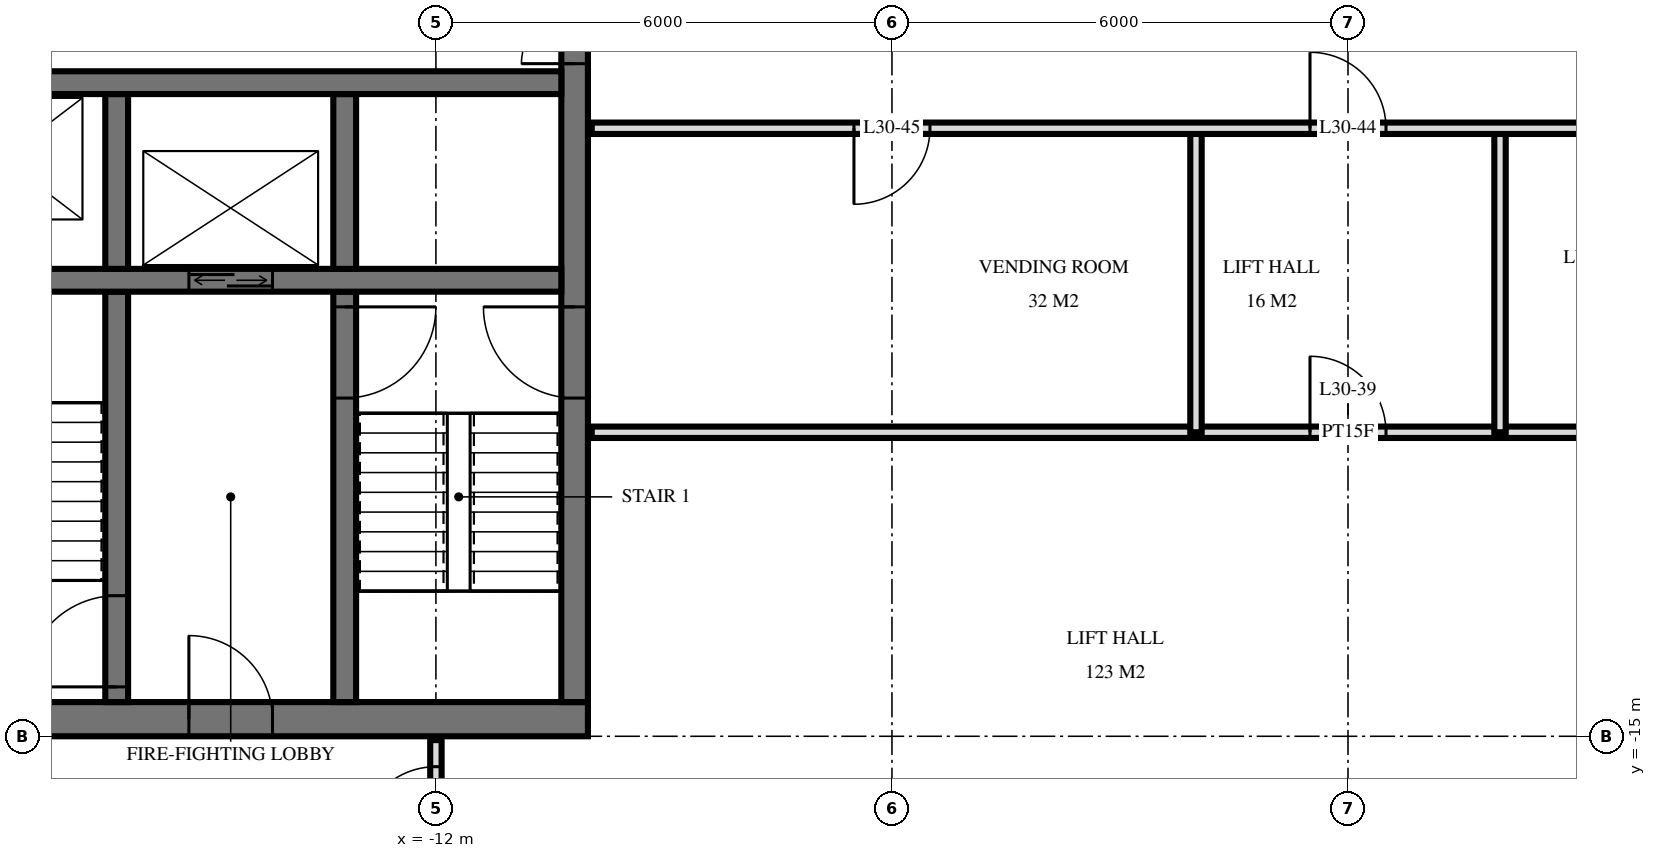
"""IFC4 building model, lengths in metres.
Left out: names, types, materials, properties, quantities, classifications, styles, units other than length and angle.
Written with IfcOpenShell. Run it as: python <this file> out.ifc"""

import sys

from ifc_helpers import new_model, si_unit, direction, frame, frame_2d, origin, place, context, subcontext, project, spatial, rectangle, extrude, element, fill, save


model = new_model("IFC4")
c1 = context("Model", 3, precision=1e-05, world=origin(), true_north=direction((0.0, 1.0)))
c2 = subcontext(c1, "Body", "Model", "MODEL_VIEW")
j1 = project(units=[si_unit("LENGTHUNIT", "METRE"), si_unit("PLANEANGLEUNIT", "RADIAN")], contexts=[c1])
p1 = place(None, origin())
s1 = spatial("IfcSite", under=j1, at=p1, CompositionType="ELEMENT")
p2 = place(p1, origin())
s2 = spatial("IfcBuilding", under=s1, at=p2, CompositionType="ELEMENT")
p3 = place(p2, frame((0.0, 0.0, 120.0)))
s3 = spatial("IfcBuildingStorey", under=s2, at=p3, CompositionType="ELEMENT", Elevation=120.0)
p4 = place(p3, frame((-24.5, -14.775, 0.0), z_axis=(0.0, 0.0, 1.0), x_axis=(1.0, 0.0, 0.0)))
e1 = element("IfcWall", 1, at=p4, inside=s3, PredefinedType="SHEAR", context=c2, shape_type="SweptSolid", body=[
    extrude(rectangle(XDim=14.5, YDim=0.45, at=frame_2d((7.25, 0.0))), origin(), (0.0, 0.0, 1.0), 3.6),
])
p5 = place(p4, frame((6.2, 0.0, 0.0)))
e2 = element("IfcOpeningElement", 2, at=p5, cuts=e1, PredefinedType="OPENING", context=c2, shape_type="SweptSolid", body=[
    extrude(rectangle(XDim=1.2, YDim=2.1, at=frame_2d((0.6, 1.05))), frame((0.0, 0.235, 0.0), z_axis=(0.0, -1.0, 0.0), x_axis=(1.0, 0.0, 0.0)), (0.0, 0.0, 1.0), 0.47),
])
p6 = place(p4, frame((9.25, 0.0, 0.0)))
e3 = element("IfcOpeningElement", 3, at=p6, cuts=e1, PredefinedType="OPENING", context=c2, shape_type="SweptSolid", body=[
    extrude(rectangle(XDim=1.1, YDim=2.1, at=frame_2d((0.55, 1.05))), frame((0.0, 0.235, 0.0), z_axis=(0.0, -1.0, 0.0), x_axis=(1.0, 0.0, 0.0)), (0.0, 0.0, 1.0), 0.47),
])
p7 = place(p4, frame((3.5, 0.0, 0.0)))
e4 = element("IfcOpeningElement", 4, at=p7, cuts=e1, PredefinedType="OPENING", context=c2, shape_type="SweptSolid", body=[
    extrude(rectangle(XDim=0.9, YDim=2.1, at=frame_2d((0.45, 1.05))), frame((0.0, 0.235, 0.0), z_axis=(0.0, -1.0, 0.0), x_axis=(1.0, 0.0, 0.0)), (0.0, 0.0, 1.0), 0.47),
])
p8 = place(p4, frame((1.05, 0.0, 0.0)))
e5 = element("IfcOpeningElement", 5, at=p8, cuts=e1, PredefinedType="OPENING", context=c2, shape_type="SweptSolid", body=[
    extrude(rectangle(XDim=1.0, YDim=2.1, at=frame_2d((0.5, 1.05))), frame((0.0, 0.235, 0.0), z_axis=(0.0, -1.0, 0.0), x_axis=(1.0, 0.0, 0.0)), (0.0, 0.0, 1.0), 0.47),
])
p9 = place(p3, frame((-10.175, -14.55, 0.0), z_axis=(0.0, 0.0, 1.0), x_axis=(0.0, 1.0, 0.0)))
e6 = element("IfcWall", 6, at=p9, inside=s3, PredefinedType="SHEAR", context=c2, shape_type="SweptSolid", body=[
    extrude(rectangle(XDim=14.1, YDim=0.35, at=frame_2d((7.05, 0.0))), origin(), (0.0, 0.0, 1.0), 3.6),
])
p10 = place(p9, frame((8.4, 0.0, 0.0)))
e7 = element("IfcOpeningElement", 7, at=p10, cuts=e6, PredefinedType="OPENING", context=c2, shape_type="SweptSolid", body=[
    extrude(rectangle(XDim=1.4, YDim=2.4, at=frame_2d((0.7, 1.2))), frame((0.0, 0.185, 0.0), z_axis=(0.0, -1.0, 0.0), x_axis=(1.0, 0.0, 0.0)), (0.0, 0.0, 1.0), 0.37),
])
p11 = place(p9, frame((10.0, 0.0, 0.0)))
e8 = element("IfcOpeningElement", 8, at=p11, cuts=e6, PredefinedType="OPENING", context=c2, shape_type="SweptSolid", body=[
    extrude(rectangle(XDim=1.4, YDim=2.4, at=frame_2d((0.7, 1.2))), frame((0.0, 0.185, 0.0), z_axis=(0.0, -1.0, 0.0), x_axis=(1.0, 0.0, 0.0)), (0.0, 0.0, 1.0), 0.37),
])
p12 = place(p9, frame((4.0, 0.0, 0.0)))
e9 = element("IfcOpeningElement", 9, at=p12, cuts=e6, PredefinedType="OPENING", context=c2, shape_type="SweptSolid", body=[
    extrude(rectangle(XDim=1.2, YDim=2.1, at=frame_2d((0.6, 1.05))), frame((0.0, 0.185, 0.0), z_axis=(0.0, -1.0, 0.0), x_axis=(1.0, 0.0, 0.0)), (0.0, 0.0, 1.0), 0.37),
])
p13 = place(p3, frame((-24.05, -6.4, 0.0), z_axis=(0.0, 0.0, 1.0), x_axis=(1.0, 0.0, 0.0)))
e10 = element("IfcWall", 10, at=p13, inside=s3, PredefinedType="SHEAR", context=c2, shape_type="SweptSolid", body=[
    extrude(rectangle(XDim=13.7, YDim=0.3, at=frame_2d((6.85, 0.0))), origin(), (0.0, 0.0, 1.0), 3.6),
])
p14 = place(p13, frame((0.55, 0.0, 0.0)))
e11 = element("IfcOpeningElement", 11, at=p14, cuts=e10, PredefinedType="OPENING", context=c2, shape_type="SweptSolid", body=[
    extrude(rectangle(XDim=1.1, YDim=2.1, at=frame_2d((0.55, 1.05))), frame((0.0, 0.16, 0.0), z_axis=(0.0, -1.0, 0.0), x_axis=(1.0, 0.0, 0.0)), (0.0, 0.0, 1.0), 0.32),
])
p15 = place(p13, frame((5.8, 0.0, 0.0)))
e12 = element("IfcOpeningElement", 12, at=p15, cuts=e10, PredefinedType="OPENING", context=c2, shape_type="SweptSolid", body=[
    extrude(rectangle(XDim=1.1, YDim=2.1, at=frame_2d((0.55, 1.05))), frame((0.0, 0.16, 0.0), z_axis=(0.0, -1.0, 0.0), x_axis=(1.0, 0.0, 0.0)), (0.0, 0.0, 1.0), 0.32),
])
p16 = place(p3, frame((-24.05, -9.0, 0.0), z_axis=(0.0, 0.0, 1.0), x_axis=(1.0, 0.0, 0.0)))
e13 = element("IfcWall", 13, at=p16, inside=s3, PredefinedType="SHEAR", context=c2, shape_type="SweptSolid", body=[
    extrude(rectangle(XDim=13.7, YDim=0.3, at=frame_2d((6.85, 0.0))), origin(), (0.0, 0.0, 1.0), 3.6),
])
p17 = place(p16, frame((8.8, 0.0, 0.0)))
e14 = element("IfcOpeningElement", 14, at=p17, cuts=e13, PredefinedType="OPENING", context=c2, shape_type="SweptSolid", body=[
    extrude(rectangle(XDim=1.1, YDim=2.1, at=frame_2d((0.55, 1.05))), frame((0.0, 0.16, 0.0), z_axis=(0.0, -1.0, 0.0), x_axis=(1.0, 0.0, 0.0)), (0.0, 0.0, 1.0), 0.32),
])
p18 = place(p3, frame((-13.2, -8.85, 0.0), z_axis=(0.0, 0.0, 1.0), x_axis=(0.0, 1.0, 0.0)))
e15 = element("IfcWall", 15, at=p18, inside=s3, PredefinedType="SHEAR", context=c2, shape_type="SweptSolid", body=[
    extrude(rectangle(XDim=2.3, YDim=0.3, at=frame_2d((1.15, 0.0))), origin(), (0.0, 0.0, 1.0), 3.6),
])
p19 = place(p3, frame((-13.2, -14.55, 0.0), z_axis=(0.0, 0.0, 1.0), x_axis=(0.0, 1.0, 0.0)))
e16 = element("IfcWall", 16, at=p19, inside=s3, PredefinedType="SHEAR", context=c2, shape_type="SweptSolid", body=[
    extrude(rectangle(XDim=5.4, YDim=0.3, at=frame_2d((2.7, 0.0))), origin(), (0.0, 0.0, 1.0), 3.6),
])
p20 = place(p19, frame((4.0, 0.0, 0.0)))
e17 = element("IfcOpeningElement", 17, at=p20, cuts=e16, PredefinedType="OPENING", context=c2, shape_type="SweptSolid", body=[
    extrude(rectangle(XDim=1.2, YDim=2.1, at=frame_2d((0.6, 1.05))), frame((0.0, 0.16, 0.0), z_axis=(0.0, -1.0, 0.0), x_axis=(1.0, 0.0, 0.0)), (0.0, 0.0, 1.0), 0.32),
])
p21 = place(p3, frame((-16.2, -8.85, 0.0), z_axis=(0.0, 0.0, 1.0), x_axis=(0.0, 1.0, 0.0)))
e18 = element("IfcWall", 18, at=p21, inside=s3, PredefinedType="SHEAR", context=c2, shape_type="SweptSolid", body=[
    extrude(rectangle(XDim=2.3, YDim=0.3, at=frame_2d((1.15, 0.0))), origin(), (0.0, 0.0, 1.0), 3.6),
])
p22 = place(p3, frame((-16.2, -14.55, 0.0), z_axis=(0.0, 0.0, 1.0), x_axis=(0.0, 1.0, 0.0)))
e19 = element("IfcWall", 19, at=p22, inside=s3, PredefinedType="SHEAR", context=c2, shape_type="SweptSolid", body=[
    extrude(rectangle(XDim=5.4, YDim=0.3, at=frame_2d((2.7, 0.0))), origin(), (0.0, 0.0, 1.0), 3.6),
])
p23 = place(p22, frame((0.2, 0.0, 0.0)))
e20 = element("IfcOpeningElement", 20, at=p23, cuts=e19, PredefinedType="OPENING", context=c2, shape_type="SweptSolid", body=[
    extrude(rectangle(XDim=1.2, YDim=2.1, at=frame_2d((0.6, 1.05))), frame((0.0, 0.16, 0.0), z_axis=(0.0, -1.0, 0.0), x_axis=(1.0, 0.0, 0.0)), (0.0, 0.0, 1.0), 0.32),
])
for number, where, z_axis, x_axis in (
    (21, (2.0, -11.0, 0.0), (0.0, 0.0, 1.0), (0.0, 1.0, 0.0)),
    (22, (-2.0, -11.0, 0.0), (0.0, 0.0, 1.0), (0.0, 1.0, 0.0)),
):
    element("IfcWall", number, at=place(p3, frame(where, z_axis=z_axis, x_axis=x_axis)), inside=s3, PredefinedType="PARTITIONING", context=c2, shape_type="SweptSolid", body=[
        extrude(rectangle(XDim=4.0, YDim=0.15, at=frame_2d((2.0, 0.0))), origin(), (0.0, 0.0, 1.0), 3.32),
    ])
p24 = place(p3, frame((-12.0, -16.8, 0.0), z_axis=(0.0, 0.0, 1.0), x_axis=(0.0, 1.0, 0.0)))
e23 = element("IfcWall", 23, at=p24, inside=s3, PredefinedType="PARTITIONING", context=c2, shape_type="SweptSolid", body=[
    extrude(rectangle(XDim=1.75, YDim=0.15, at=frame_2d((0.875, 0.0))), origin(), (0.0, 0.0, 1.0), 3.32),
])
p25 = place(p24, frame((0.4, 0.0, 0.0)))
e24 = element("IfcOpeningElement", 24, at=p25, cuts=e23, PredefinedType="OPENING", context=c2, shape_type="SweptSolid", body=[
    extrude(rectangle(XDim=1.0, YDim=2.1, at=frame_2d((0.5, 1.05))), frame((0.0, 0.085, 0.0), z_axis=(0.0, -1.0, 0.0), x_axis=(1.0, 0.0, 0.0)), (0.0, 0.0, 1.0), 0.17),
])
p26 = place(p3, frame((-9.95, -11.0, 0.0), z_axis=(0.0, 0.0, 1.0), x_axis=(1.0, 0.0, 0.0)))
e25 = element("IfcWall", 25, at=p26, inside=s3, PredefinedType="PARTITIONING", context=c2, shape_type="SweptSolid", body=[
    extrude(rectangle(XDim=19.9, YDim=0.15, at=frame_2d((9.95, 0.0))), origin(), (0.0, 0.0, 1.0), 3.32),
])
p27 = place(p26, frame((9.45, 0.0, 0.0)))
e26 = element("IfcOpeningElement", 26, at=p27, cuts=e25, PredefinedType="OPENING", context=c2, shape_type="SweptSolid", body=[
    extrude(rectangle(XDim=1.0, YDim=2.1, at=frame_2d((0.5, 1.05))), frame((0.0, 0.085, 0.0), z_axis=(0.0, -1.0, 0.0), x_axis=(1.0, 0.0, 0.0)), (0.0, 0.0, 1.0), 0.17),
])
p28 = place(p26, frame((15.45, 0.0, 0.0)))
e27 = element("IfcOpeningElement", 27, at=p28, cuts=e25, PredefinedType="OPENING", context=c2, shape_type="SweptSolid", body=[
    extrude(rectangle(XDim=1.0, YDim=2.1, at=frame_2d((0.5, 1.05))), frame((0.0, 0.085, 0.0), z_axis=(0.0, -1.0, 0.0), x_axis=(1.0, 0.0, 0.0)), (0.0, 0.0, 1.0), 0.17),
])
p29 = place(p3, frame((-9.95, -7.0, 0.0), z_axis=(0.0, 0.0, 1.0), x_axis=(1.0, 0.0, 0.0)))
e28 = element("IfcWall", 28, at=p29, inside=s3, PredefinedType="PARTITIONING", context=c2, shape_type="SweptSolid", body=[
    extrude(rectangle(XDim=19.9, YDim=0.15, at=frame_2d((9.95, 0.0))), origin(), (0.0, 0.0, 1.0), 3.32),
])
p30 = place(p29, frame((9.45, 0.0, 0.0)))
e29 = element("IfcOpeningElement", 29, at=p30, cuts=e28, PredefinedType="OPENING", context=c2, shape_type="SweptSolid", body=[
    extrude(rectangle(XDim=1.0, YDim=2.1, at=frame_2d((0.5, 1.05))), frame((0.0, 0.085, 0.0), z_axis=(0.0, -1.0, 0.0), x_axis=(1.0, 0.0, 0.0)), (0.0, 0.0, 1.0), 0.17),
])
p31 = place(p29, frame((3.45, 0.0, 0.0)))
e30 = element("IfcOpeningElement", 30, at=p31, cuts=e28, PredefinedType="OPENING", context=c2, shape_type="SweptSolid", body=[
    extrude(rectangle(XDim=1.0, YDim=2.1, at=frame_2d((0.5, 1.05))), frame((0.0, 0.085, 0.0), z_axis=(0.0, -1.0, 0.0), x_axis=(1.0, 0.0, 0.0)), (0.0, 0.0, 1.0), 0.17),
])
p32 = place(p17, origin())
e31 = element("IfcDoor", 31, at=p32, inside=s3, OperationType="DOUBLE_DOOR_SLIDING", PredefinedType="USERDEFINED", context=c2, shape_type="SweptSolid", body=[
    extrude(rectangle(XDim=1.1, YDim=2.1, at=frame_2d((0.55, 1.05))), frame((0.0, 0.025, 0.0), z_axis=(0.0, -1.0, 0.0), x_axis=(1.0, 0.0, 0.0)), (0.0, 0.0, 1.0), 0.05),
])
fill(e14, e31)
p33 = place(p10, origin())
e32 = element("IfcDoor", 32, at=p33, inside=s3, OperationType="DOUBLE_DOOR_SINGLE_SWING", PredefinedType="DOOR", context=c2, shape_type="SweptSolid", body=[
    extrude(rectangle(XDim=1.4, YDim=2.4, at=frame_2d((0.7, 1.2))), frame((0.0, 0.025, 0.0), z_axis=(0.0, -1.0, 0.0), x_axis=(1.0, 0.0, 0.0)), (0.0, 0.0, 1.0), 0.05),
])
fill(e7, e32)
p34 = place(p12, origin())
e33 = element("IfcDoor", 33, at=p34, inside=s3, OperationType="SINGLE_SWING_LEFT", PredefinedType="DOOR", context=c2, shape_type="SweptSolid", body=[
    extrude(rectangle(XDim=1.2, YDim=2.1, at=frame_2d((0.6, 1.05))), frame((0.0, 0.025, 0.0), z_axis=(0.0, -1.0, 0.0), x_axis=(1.0, 0.0, 0.0)), (0.0, 0.0, 1.0), 0.05),
])
fill(e9, e33)
p35 = place(p6, origin())
e34 = element("IfcDoor", 34, at=p35, inside=s3, OperationType="SINGLE_SWING_RIGHT", PredefinedType="DOOR", context=c2, shape_type="SweptSolid", body=[
    extrude(rectangle(XDim=1.1, YDim=2.1, at=frame_2d((0.55, 1.05))), frame((0.0, 0.025, 0.0), z_axis=(0.0, -1.0, 0.0), x_axis=(1.0, 0.0, 0.0)), (0.0, 0.0, 1.0), 0.05),
])
fill(e3, e34)
p36 = place(p20, frame((0.6, 0.0, 0.0), z_axis=(0.0, 0.0, 1.0), x_axis=(-1.0, 0.0, 0.0)))
e35 = element("IfcDoor", 35, at=p36, inside=s3, OperationType="SINGLE_SWING_RIGHT", PredefinedType="DOOR", context=c2, shape_type="SweptSolid", body=[
    extrude(rectangle(XDim=1.2, YDim=2.1, at=frame_2d((0.0, 1.05))), frame((0.0, -0.025, 0.0), z_axis=(0.0, 1.0, 0.0), x_axis=(-1.0, 0.0, 0.0)), (0.0, 0.0, 1.0), 0.05),
])
fill(e17, e35)
p37 = place(p23, origin())
e36 = element("IfcDoor", 36, at=p37, inside=s3, OperationType="SINGLE_SWING_RIGHT", PredefinedType="DOOR", context=c2, shape_type="SweptSolid", body=[
    extrude(rectangle(XDim=1.2, YDim=2.1, at=frame_2d((0.6, 1.05))), frame((0.0, 0.025, 0.0), z_axis=(0.0, -1.0, 0.0), x_axis=(1.0, 0.0, 0.0)), (0.0, 0.0, 1.0), 0.05),
])
fill(e20, e36)
p38 = place(p25, origin())
e37 = element("IfcDoor", 37, at=p38, inside=s3, OperationType="SINGLE_SWING_RIGHT", PredefinedType="DOOR", context=c2, shape_type="SweptSolid", body=[
    extrude(rectangle(XDim=1.0, YDim=2.1, at=frame_2d((0.5, 1.05))), frame((0.0, 0.025, 0.0), z_axis=(0.0, -1.0, 0.0), x_axis=(1.0, 0.0, 0.0)), (0.0, 0.0, 1.0), 0.05),
])
fill(e24, e37)
p39 = place(p27, origin())
e38 = element("IfcDoor", 38, at=p39, inside=s3, OperationType="SINGLE_SWING_RIGHT", PredefinedType="DOOR", context=c2, shape_type="SweptSolid", body=[
    extrude(rectangle(XDim=1.0, YDim=2.1, at=frame_2d((0.5, 1.05))), frame((0.0, 0.025, 0.0), z_axis=(0.0, -1.0, 0.0), x_axis=(1.0, 0.0, 0.0)), (0.0, 0.0, 1.0), 0.05),
])
fill(e26, e38)
p40 = place(p30, origin())
e39 = element("IfcDoor", 39, at=p40, inside=s3, OperationType="SINGLE_SWING_RIGHT", PredefinedType="DOOR", context=c2, shape_type="SweptSolid", body=[
    extrude(rectangle(XDim=1.0, YDim=2.1, at=frame_2d((0.5, 1.05))), frame((0.0, 0.025, 0.0), z_axis=(0.0, -1.0, 0.0), x_axis=(1.0, 0.0, 0.0)), (0.0, 0.0, 1.0), 0.05),
])
fill(e29, e39)
p41 = place(p31, frame((0.5, 0.0, 0.0), z_axis=(0.0, 0.0, 1.0), x_axis=(-1.0, 0.0, 0.0)))
e40 = element("IfcDoor", 40, at=p41, inside=s3, OperationType="SINGLE_SWING_LEFT", PredefinedType="DOOR", context=c2, shape_type="SweptSolid", body=[
    extrude(rectangle(XDim=1.0, YDim=2.1, at=frame_2d((0.0, 1.05))), frame((0.0, -0.025, 0.0), z_axis=(0.0, 1.0, 0.0), x_axis=(-1.0, 0.0, 0.0)), (0.0, 0.0, 1.0), 0.05),
])
fill(e30, e40)
save(model, sys.argv[1])
